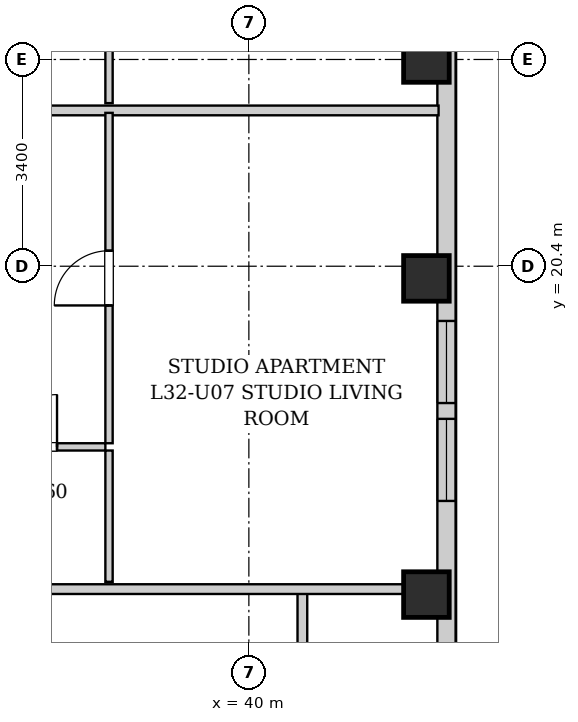
"""IFC4 building model, lengths in metres.
Left out: names, types, materials, properties, quantities, classifications, styles, units other than length and angle.
Written with IfcOpenShell. Run it as: python <this file> out.ifc"""

import sys

from ifc_helpers import new_model, si_unit, direction, frame, frame_2d, origin, origin_2d, place, context, subcontext, project, spatial, rectangle, extrude, element, fill, save


model = new_model("IFC4")
c1 = context("Model", 3, precision=1e-05, world=origin(), true_north=direction((0.0, 1.0)))
c2 = subcontext(c1, "Body", "Model", "MODEL_VIEW")
j1 = project(units=[si_unit("LENGTHUNIT", "METRE"), si_unit("PLANEANGLEUNIT", "RADIAN")], contexts=[c1])
p1 = place(None, origin())
s1 = spatial("IfcSite", under=j1, at=p1, CompositionType="ELEMENT")
p2 = place(p1, origin())
s2 = spatial("IfcBuilding", under=s1, at=p2, CompositionType="ELEMENT")
p3 = place(p2, frame((0.0, 0.0, 113.5)))
s3 = spatial("IfcBuildingStorey", under=s2, at=p3, CompositionType="ELEMENT", Elevation=113.5)
for number, where, z_axis, x_axis in (
    (1, (42.92, 15.0, 0.0), (0.0, 0.0, 1.0), (1.0, 0.0, 0.0)),
    (2, (42.92, 20.2, 0.0), (0.0, 0.0, 1.0), (1.0, 0.0, 0.0)),
    (3, (42.92, 23.8, 0.0), (0.0, 0.0, 1.0), (1.0, 0.0, 0.0)),
):
    element("IfcColumn", number, at=place(p3, frame(where, z_axis=z_axis, x_axis=x_axis)), inside=s3, PredefinedType="COLUMN", context=c2, shape_type="SweptSolid", body=[
        extrude(rectangle(XDim=0.75, YDim=0.75, at=origin_2d()), origin(), (0.0, 0.0, 1.0), 3.2),
    ])
p4 = place(p3, frame((43.25, 24.6, 0.0), z_axis=(0.0, 0.0, 1.0), x_axis=(0.0, -1.0, 0.0)))
e4 = element("IfcWall", 4, at=p4, inside=s3, PredefinedType="SOLIDWALL", context=c2, shape_type="SweptSolid", body=[
    extrude(rectangle(XDim=22.1, YDim=0.3, at=frame_2d((11.05, 0.0))), origin(), (0.0, 0.0, 1.0), 2.94),
])
p5 = place(p4, frame((17.366, 0.0, 0.55)))
e5 = element("IfcOpeningElement", 5, at=p5, cuts=e4, PredefinedType="OPENING", context=c2, shape_type="SweptSolid", body=[
    extrude(rectangle(XDim=1.35, YDim=1.2, at=frame_2d((0.675, 0.6))), frame((0.0, 0.16, 0.0), z_axis=(0.0, -1.0, 0.0), x_axis=(1.0, 0.0, 0.0)), (0.0, 0.0, 1.0), 0.32),
])
p6 = place(p4, frame((15.535, 0.0, 0.55)))
e6 = element("IfcOpeningElement", 6, at=p6, cuts=e4, PredefinedType="OPENING", context=c2, shape_type="SweptSolid", body=[
    extrude(rectangle(XDim=1.35, YDim=1.2, at=frame_2d((0.675, 0.6))), frame((0.0, 0.16, 0.0), z_axis=(0.0, -1.0, 0.0), x_axis=(1.0, 0.0, 0.0)), (0.0, 0.0, 1.0), 0.32),
])
p7 = place(p4, frame((5.1, 0.0, 0.55)))
e7 = element("IfcOpeningElement", 7, at=p7, cuts=e4, PredefinedType="OPENING", context=c2, shape_type="SweptSolid", body=[
    extrude(rectangle(XDim=1.35, YDim=1.2, at=frame_2d((0.675, 0.6))), frame((0.0, 0.16, 0.0), z_axis=(0.0, -1.0, 0.0), x_axis=(1.0, 0.0, 0.0)), (0.0, 0.0, 1.0), 0.32),
])
p8 = place(p4, frame((6.71, 0.0, 0.55)))
e8 = element("IfcOpeningElement", 8, at=p8, cuts=e4, PredefinedType="OPENING", context=c2, shape_type="SweptSolid", body=[
    extrude(rectangle(XDim=1.35, YDim=1.2, at=frame_2d((0.675, 0.6))), frame((0.0, 0.16, 0.0), z_axis=(0.0, -1.0, 0.0), x_axis=(1.0, 0.0, 0.0)), (0.0, 0.0, 1.0), 0.32),
])
p9 = place(p3, frame((40.88, 13.35, 0.0), z_axis=(0.0, 0.0, 1.0), x_axis=(0.0, 1.0, 0.0)))
e9 = element("IfcWall", 9, at=p9, inside=s3, PredefinedType="PARTITIONING", context=c2, shape_type="SweptSolid", body=[
    extrude(rectangle(XDim=1.74, YDim=0.16, at=frame_2d((0.87, 0.0))), origin(), (0.0, 0.0, 1.0), 2.94),
])
p10 = place(p3, frame((35.11, 15.09, 0.0), z_axis=(0.0, 0.0, 1.0), x_axis=(1.0, 0.0, 0.0)))
e10 = element("IfcWall", 10, at=p10, inside=s3, PredefinedType="PARTITIONING", context=c2, shape_type="SweptSolid", body=[
    extrude(rectangle(XDim=8.01, YDim=0.16, at=frame_2d((4.005, 0.0))), origin(), (0.0, 0.0, 1.0), 2.313),
])
p11 = place(p3, frame((35.19, 22.962, 0.0), z_axis=(0.0, 0.0, 1.0), x_axis=(1.0, 0.0, 0.0)))
e11 = element("IfcWall", 11, at=p11, inside=s3, PredefinedType="PARTITIONING", context=c2, shape_type="SweptSolid", body=[
    extrude(rectangle(XDim=7.93, YDim=0.16, at=frame_2d((3.965, 0.0))), origin(), (0.0, 0.0, 1.0), 2.94),
])
p12 = place(p3, frame((35.19, 17.429, 0.0), z_axis=(0.0, 0.0, 1.0), x_axis=(1.0, 0.0, 0.0)))
e12 = element("IfcWall", 12, at=p12, inside=s3, PredefinedType="PARTITIONING", context=c2, shape_type="SweptSolid", body=[
    extrude(rectangle(XDim=2.45, YDim=0.12, at=frame_2d((1.225, 0.0))), origin(), (0.0, 0.0, 1.0), 2.94),
])
p13 = place(p12, frame((0.795, 0.0, 0.0)))
e13 = element("IfcOpeningElement", 13, at=p13, cuts=e12, PredefinedType="OPENING", context=c2, shape_type="SweptSolid", body=[
    extrude(rectangle(XDim=0.86, YDim=2.05, at=frame_2d((0.43, 1.025))), frame((0.0, 0.07, 0.0), z_axis=(0.0, -1.0, 0.0), x_axis=(1.0, 0.0, 0.0)), (0.0, 0.0, 1.0), 0.14),
])
p14 = place(p3, frame((37.7, 15.21, 0.0), z_axis=(0.0, 0.0, 1.0), x_axis=(0.0, 1.0, 0.0)))
e14 = element("IfcWall", 14, at=p14, inside=s3, PredefinedType="PARTITIONING", context=c2, shape_type="SweptSolid", body=[
    extrude(rectangle(XDim=2.159, YDim=0.12, at=frame_2d((1.08, 0.0))), origin(), (0.0, 0.0, 1.0), 2.94),
])
p15 = place(p3, frame((37.7, 17.489, 0.0), z_axis=(0.0, 0.0, 1.0), x_axis=(0.0, 1.0, 0.0)))
e15 = element("IfcWall", 15, at=p15, inside=s3, PredefinedType="PARTITIONING", context=c2, shape_type="SweptSolid", body=[
    extrude(rectangle(XDim=5.433, YDim=0.12, at=frame_2d((2.717, 0.0))), origin(), (0.0, 0.0, 1.0), 2.94),
])
p16 = place(p15, frame((2.266, 0.0, 0.0)))
e16 = element("IfcOpeningElement", 16, at=p16, cuts=e15, PredefinedType="OPENING", context=c2, shape_type="SweptSolid", body=[
    extrude(rectangle(XDim=0.9, YDim=2.05, at=frame_2d((0.45, 1.025))), frame((0.0, 0.07, 0.0), z_axis=(0.0, -1.0, 0.0), x_axis=(1.0, 0.0, 0.0)), (0.0, 0.0, 1.0), 0.14),
])
p17 = place(p3, frame((37.7, 23.082, 0.0), z_axis=(0.0, 0.0, 1.0), x_axis=(0.0, 1.0, 0.0)))
e17 = element("IfcWall", 17, at=p17, inside=s3, PredefinedType="PARTITIONING", context=c2, shape_type="SweptSolid", body=[
    extrude(rectangle(XDim=1.85, YDim=0.12, at=frame_2d((0.925, 0.0))), origin(), (0.0, 0.0, 1.0), 2.94),
])
p18 = place(p13, origin())
e18 = element("IfcDoor", 18, at=p18, inside=s3, OperationType="SINGLE_SWING_RIGHT", PredefinedType="DOOR", context=c2, shape_type="SweptSolid", body=[
    extrude(rectangle(XDim=0.86, YDim=2.05, at=frame_2d((0.43, 1.025))), frame((0.0, 0.025, 0.0), z_axis=(0.0, -1.0, 0.0), x_axis=(1.0, 0.0, 0.0)), (0.0, 0.0, 1.0), 0.05),
])
fill(e13, e18)
p19 = place(p16, origin())
e19 = element("IfcDoor", 19, at=p19, inside=s3, OperationType="SINGLE_SWING_LEFT", PredefinedType="DOOR", context=c2, shape_type="SweptSolid", body=[
    extrude(rectangle(XDim=0.9, YDim=2.05, at=frame_2d((0.45, 1.025))), frame((0.0, 0.025, 0.0), z_axis=(0.0, -1.0, 0.0), x_axis=(1.0, 0.0, 0.0)), (0.0, 0.0, 1.0), 0.05),
])
fill(e16, e19)
p20 = place(p7, origin())
e20 = element("IfcWindow", 20, at=p20, inside=s3, PartitioningType="SINGLE_PANEL", PredefinedType="WINDOW", context=c2, shape_type="SweptSolid", body=[
    extrude(rectangle(XDim=1.35, YDim=1.2, at=frame_2d((0.675, 0.6))), frame((0.0, 0.03, 0.0), z_axis=(0.0, -1.0, 0.0), x_axis=(1.0, 0.0, 0.0)), (0.0, 0.0, 1.0), 0.06),
])
fill(e7, e20)
p21 = place(p8, origin())
e21 = element("IfcWindow", 21, at=p21, inside=s3, PartitioningType="SINGLE_PANEL", PredefinedType="WINDOW", context=c2, shape_type="SweptSolid", body=[
    extrude(rectangle(XDim=1.35, YDim=1.2, at=frame_2d((0.675, 0.6))), frame((0.0, 0.03, 0.0), z_axis=(0.0, -1.0, 0.0), x_axis=(1.0, 0.0, 0.0)), (0.0, 0.0, 1.0), 0.06),
])
fill(e8, e21)
save(model, sys.argv[1])
